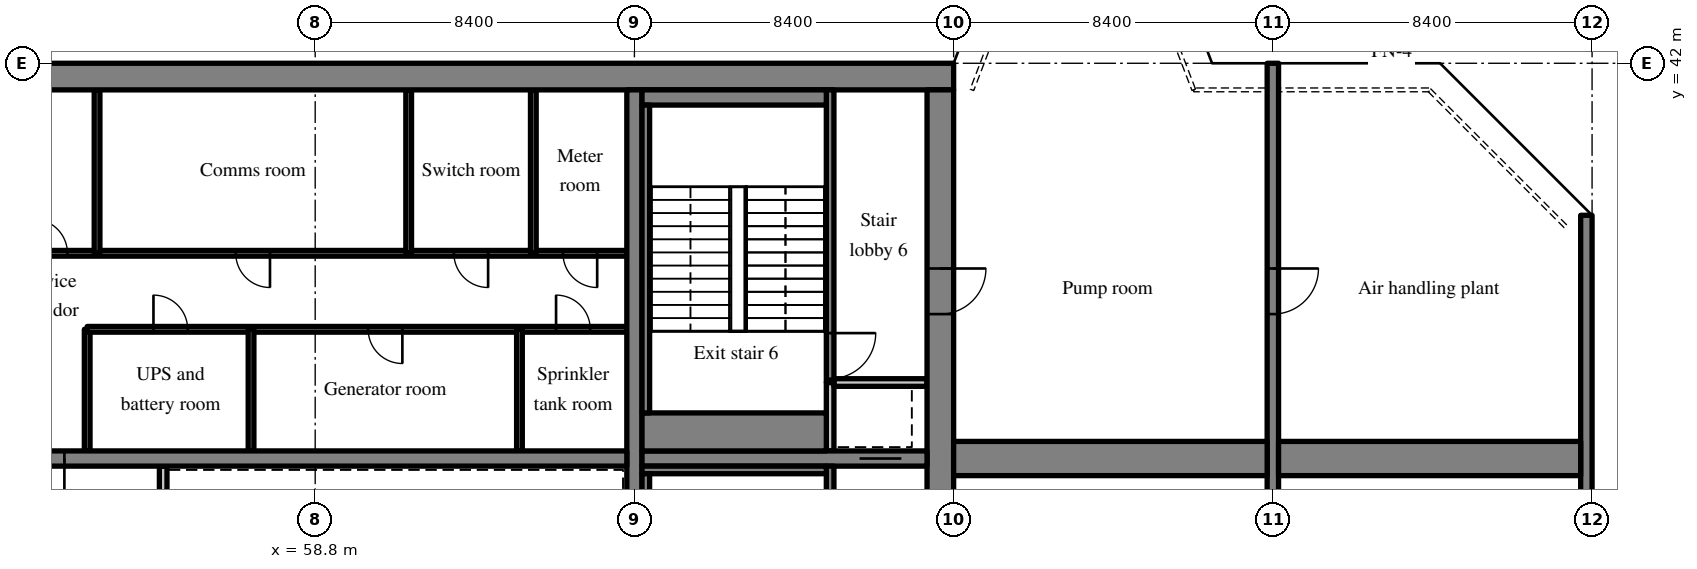
"""IFC4 building model, lengths in metres.
Left out: names, types, materials, properties, quantities, classifications, styles, units other than length and angle.
Written with IfcOpenShell. Run it as: python <this file> out.ifc"""

import sys

from ifc_helpers import new_model, si_unit, direction, frame, frame_2d, origin, place, context, subcontext, project, spatial, rectangle, extrude, source, transform, mapped, element, fill, save


model = new_model("IFC4")
c1 = context("Model", 3, precision=1e-05, world=origin(), true_north=direction((0.0, 1.0)))
c2 = subcontext(c1, "Body", "Model", "MODEL_VIEW")
j1 = project(units=[si_unit("LENGTHUNIT", "METRE"), si_unit("PLANEANGLEUNIT", "RADIAN")], contexts=[c1])
p1 = place(None, origin())
s1 = spatial("IfcSite", under=j1, at=p1, CompositionType="ELEMENT")
p2 = place(p1, origin())
s2 = spatial("IfcBuilding", under=s1, at=p2, CompositionType="ELEMENT")
p3 = place(p2, frame((0.0, 0.0, 201.0)))
s3 = spatial("IfcBuildingStorey", under=s2, at=p3, CompositionType="ELEMENT", Elevation=201.0)
m1 = source(origin(), c2, "Body", "SweptSolid", [
    extrude(rectangle(XDim=50.4, YDim=0.7, at=frame_2d((25.2, 0.0))), origin(), (0.0, 0.0, 1.0), 5.12),
])
p4 = place(p3, frame((25.2, 41.65, 0.0), z_axis=(0.0, 0.0, 1.0), x_axis=(1.0, 0.0, 0.0)))
e1 = element("IfcWall", 1, at=p4, inside=s3, PredefinedType="SHEAR", context=c2, shape_type="MappedRepresentation", body=[
    mapped(m1, transform((0.0, 0.0, 0.0), scale=1.0)),
])
m2 = source(origin(), c2, "Body", "SweptSolid", [
    extrude(rectangle(XDim=18.6, YDim=0.7, at=frame_2d((9.3, 0.0))), origin(), (0.0, 0.0, 1.0), 5.12),
])
p5 = place(p3, frame((75.25, 22.7, 0.0), z_axis=(0.0, 0.0, 1.0), x_axis=(0.0, 1.0, 0.0)))
e2 = element("IfcWall", 2, at=p5, inside=s3, PredefinedType="SHEAR", context=c2, shape_type="MappedRepresentation", body=[
    mapped(m2, transform((0.0, 0.0, 0.0), scale=1.0)),
])
m3 = source(origin(), c2, "Body", "SweptSolid", [
    extrude(rectangle(XDim=1.0, YDim=2.1, at=frame_2d((0.5, 1.05))), frame((0.0, 0.36, 0.0), z_axis=(0.0, -1.0, 0.0), x_axis=(1.0, 0.0, 0.0)), (0.0, 0.0, 1.0), 0.72),
])
p6 = place(p5, frame((2.8, 0.0, 0.0)))
e3 = element("IfcOpeningElement", 3, at=p6, cuts=e2, PredefinedType="OPENING", context=c2, shape_type="MappedRepresentation", body=[
    mapped(m3, transform((0.0, 0.0, 0.0), scale=1.0)),
])
m4 = source(origin(), c2, "Body", "SweptSolid", [
    extrude(rectangle(XDim=1.2, YDim=2.1, at=frame_2d((0.6, 1.05))), frame((0.0, 0.36, 0.0), z_axis=(0.0, -1.0, 0.0), x_axis=(1.0, 0.0, 0.0)), (0.0, 0.0, 1.0), 0.72),
])
p7 = place(p5, frame((12.7, 0.0, 0.0)))
e4 = element("IfcOpeningElement", 4, at=p7, cuts=e2, PredefinedType="OPENING", context=c2, shape_type="MappedRepresentation", body=[
    mapped(m4, transform((0.0, 0.0, 0.0), scale=1.0)),
])
m5 = source(origin(), c2, "Body", "SweptSolid", [
    extrude(rectangle(XDim=18.6, YDim=0.4, at=frame_2d((9.3, 0.0))), origin(), (0.0, 0.0, 1.0), 5.12),
])
p8 = place(p3, frame((67.2, 22.7, 0.0), z_axis=(0.0, 0.0, 1.0), x_axis=(0.0, 1.0, 0.0)))
e5 = element("IfcWall", 5, at=p8, inside=s3, PredefinedType="SHEAR", context=c2, shape_type="MappedRepresentation", body=[
    mapped(m5, transform((0.0, 0.0, 0.0), scale=1.0)),
])
m6 = source(origin(), c2, "Body", "SweptSolid", [
    extrude(rectangle(XDim=16.4, YDim=0.4, at=frame_2d((8.2, 0.0))), origin(), (0.0, 0.0, 1.0), 5.12),
])
p9 = place(p3, frame((50.6, 31.6, 0.0), z_axis=(0.0, 0.0, 1.0), x_axis=(1.0, 0.0, 0.0)))
e6 = element("IfcWall", 6, at=p9, inside=s3, PredefinedType="SHEAR", context=c2, shape_type="MappedRepresentation", body=[
    mapped(m6, transform((0.0, 0.0, 0.0), scale=1.0)),
])
m7 = source(origin(), c2, "Body", "SweptSolid", [
    extrude(rectangle(XDim=1.0, YDim=2.1, at=frame_2d((0.5, 1.05))), frame((0.0, 0.21, 0.0), z_axis=(0.0, -1.0, 0.0), x_axis=(1.0, 0.0, 0.0)), (0.0, 0.0, 1.0), 0.42),
])
p10 = place(p9, frame((0.6, 0.0, 0.0)))
e7 = element("IfcOpeningElement", 7, at=p10, cuts=e6, PredefinedType="OPENING", context=c2, shape_type="MappedRepresentation", body=[
    mapped(m7, transform((0.0, 0.0, 0.0), scale=1.0)),
])
m8 = source(origin(), c2, "Body", "SweptSolid", [
    extrude(rectangle(XDim=7.5, YDim=0.4, at=frame_2d((3.75, 0.0))), origin(), (0.0, 0.0, 1.0), 5.12),
])
p11 = place(p3, frame((67.4, 31.6, 0.0), z_axis=(0.0, 0.0, 1.0), x_axis=(1.0, 0.0, 0.0)))
e8 = element("IfcWall", 8, at=p11, inside=s3, PredefinedType="SHEAR", context=c2, shape_type="MappedRepresentation", body=[
    mapped(m8, transform((0.0, 0.0, 0.0), scale=1.0)),
])
m9 = source(origin(), c2, "Body", "SweptSolid", [
    extrude(rectangle(XDim=1.1, YDim=2.1, at=frame_2d((0.55, 1.05))), frame((0.0, 0.21, 0.0), z_axis=(0.0, -1.0, 0.0), x_axis=(1.0, 0.0, 0.0)), (0.0, 0.0, 1.0), 0.42),
])
p12 = place(p11, frame((5.725, 0.0, 0.0)))
e9 = element("IfcOpeningElement", 9, at=p12, cuts=e8, PredefinedType="OPENING", context=c2, shape_type="MappedRepresentation", body=[
    mapped(m9, transform((0.0, 0.0, 0.0), scale=1.0)),
])
m10 = source(origin(), c2, "Body", "SweptSolid", [
    extrude(rectangle(XDim=20.0, YDim=0.3, at=frame_2d((10.0, 0.0))), origin(), (0.0, 0.0, 1.0), 5.12),
])
p13 = place(p3, frame((84.0, 22.0, 0.0), z_axis=(0.0, 0.0, 1.0), x_axis=(0.0, 1.0, 0.0)))
e10 = element("IfcWall", 10, at=p13, inside=s3, PredefinedType="SHEAR", context=c2, shape_type="MappedRepresentation", body=[
    mapped(m10, transform((0.0, 0.0, 0.0), scale=1.0)),
])
m11 = source(origin(), c2, "Body", "SweptSolid", [
    extrude(rectangle(XDim=1.2, YDim=2.1, at=frame_2d((0.6, 1.05))), frame((0.0, 0.16, 0.0), z_axis=(0.0, -1.0, 0.0), x_axis=(1.0, 0.0, 0.0)), (0.0, 0.0, 1.0), 0.32),
])
p14 = place(p13, frame((13.4, 0.0, 0.0)))
e11 = element("IfcOpeningElement", 11, at=p14, cuts=e10, PredefinedType="OPENING", context=c2, shape_type="MappedRepresentation", body=[
    mapped(m11, transform((0.0, 0.0, 0.0), scale=1.0)),
])
m12 = source(origin(), c2, "Body", "SweptSolid", [
    extrude(rectangle(XDim=16.0, YDim=0.3, at=frame_2d((8.0, 0.0))), origin(), (0.0, 0.0, 1.0), 5.12),
])
p15 = place(p3, frame((92.25, 22.0, 0.0), z_axis=(0.0, 0.0, 1.0), x_axis=(0.0, 1.0, 0.0)))
e12 = element("IfcWall", 12, at=p15, inside=s3, PredefinedType="SHEAR", context=c2, shape_type="MappedRepresentation", body=[
    mapped(m12, transform((0.0, 0.0, 0.0), scale=1.0)),
])
m13 = source(origin(), c2, "Body", "SweptSolid", [
    extrude(rectangle(XDim=8.25, YDim=0.9, at=frame_2d((4.125, 0.0))), origin(), (0.0, 0.0, 1.0), 5.12),
])
p16 = place(p3, frame((75.6, 31.6, 0.0), z_axis=(0.0, 0.0, 1.0), x_axis=(1.0, 0.0, 0.0)))
e13 = element("IfcWall", 13, at=p16, inside=s3, PredefinedType="SHEAR", context=c2, shape_type="MappedRepresentation", body=[
    mapped(m13, transform((0.0, 0.0, 0.0), scale=1.0)),
])
m14 = source(origin(), c2, "Body", "SweptSolid", [
    extrude(rectangle(XDim=7.95, YDim=0.9, at=frame_2d((3.975, 0.0))), origin(), (0.0, 0.0, 1.0), 5.12),
])
p17 = place(p3, frame((84.15, 31.6, 0.0), z_axis=(0.0, 0.0, 1.0), x_axis=(1.0, 0.0, 0.0)))
e14 = element("IfcWall", 14, at=p17, inside=s3, PredefinedType="SHEAR", context=c2, shape_type="MappedRepresentation", body=[
    mapped(m14, transform((0.0, 0.0, 0.0), scale=1.0)),
])
m15 = source(origin(), c2, "Body", "SweptSolid", [
    extrude(rectangle(XDim=2.6, YDim=0.2, at=frame_2d((1.3, 0.0))), origin(), (0.0, 0.0, 1.0), 5.12),
])
p18 = place(p3, frame((54.8, 28.8, 0.0), z_axis=(0.0, 0.0, 1.0), x_axis=(0.0, 1.0, 0.0)))
e15 = element("IfcWall", 15, at=p18, inside=s3, PredefinedType="SOLIDWALL", context=c2, shape_type="MappedRepresentation", body=[
    mapped(m15, transform((0.0, 0.0, 0.0), scale=1.0)),
])
m16 = source(origin(), c2, "Body", "SweptSolid", [
    extrude(rectangle(XDim=3.2, YDim=0.15, at=frame_2d((1.6, 0.0))), origin(), (0.0, 0.0, 1.0), 5.12),
])
p19 = place(p3, frame((52.8, 31.8, 0.0), z_axis=(0.0, 0.0, 1.0), x_axis=(0.0, 1.0, 0.0)))
e16 = element("IfcWall", 16, at=p19, inside=s3, PredefinedType="PARTITIONING", context=c2, shape_type="MappedRepresentation", body=[
    mapped(m16, transform((0.0, 0.0, 0.0), scale=1.0)),
])
m17 = source(origin(), c2, "Body", "SweptSolid", [
    extrude(rectangle(XDim=14.2, YDim=0.15, at=frame_2d((7.1, 0.0))), origin(), (0.0, 0.0, 1.0), 5.12),
])
p20 = place(p3, frame((67.0, 35.0, 0.0), z_axis=(0.0, 0.0, 1.0), x_axis=(-1.0, 0.0, 0.0)))
e17 = element("IfcWall", 17, at=p20, inside=s3, PredefinedType="PARTITIONING", context=c2, shape_type="MappedRepresentation", body=[
    mapped(m17, transform((0.0, 0.0, 0.0), scale=1.0)),
])
m18 = source(origin(), c2, "Body", "SweptSolid", [
    extrude(rectangle(XDim=0.9, YDim=2.1, at=frame_2d((0.45, 1.05))), frame((0.0, 0.085, 0.0), z_axis=(0.0, -1.0, 0.0), x_axis=(1.0, 0.0, 0.0)), (0.0, 0.0, 1.0), 0.17),
])
p21 = place(p20, frame((0.962, 0.0, 0.0)))
e18 = element("IfcOpeningElement", 18, at=p21, cuts=e17, PredefinedType="OPENING", context=c2, shape_type="MappedRepresentation", body=[
    mapped(m18, transform((0.0, 0.0, 0.0), scale=1.0)),
])
p22 = place(p20, frame((5.906, 0.0, 0.0)))
e19 = element("IfcOpeningElement", 19, at=p22, cuts=e17, PredefinedType="OPENING", context=c2, shape_type="MappedRepresentation", body=[
    mapped(m18, transform((0.0, 0.0, 0.0), scale=1.0)),
])
p23 = place(p20, frame((11.556, 0.0, 0.0)))
e20 = element("IfcOpeningElement", 20, at=p23, cuts=e17, PredefinedType="OPENING", context=c2, shape_type="MappedRepresentation", body=[
    mapped(m18, transform((0.0, 0.0, 0.0), scale=1.0)),
])
m19 = source(origin(), c2, "Body", "SweptSolid", [
    extrude(rectangle(XDim=16.4, YDim=0.15, at=frame_2d((8.2, 0.0))), origin(), (0.0, 0.0, 1.0), 5.12),
])
p24 = place(p3, frame((67.0, 37.0, 0.0), z_axis=(0.0, 0.0, 1.0), x_axis=(-1.0, 0.0, 0.0)))
e21 = element("IfcWall", 21, at=p24, inside=s3, PredefinedType="PARTITIONING", context=c2, shape_type="MappedRepresentation", body=[
    mapped(m19, transform((0.0, 0.0, 0.0), scale=1.0)),
])
p25 = place(p24, frame((0.78, 0.0, 0.0)))
e22 = element("IfcOpeningElement", 22, at=p25, cuts=e21, PredefinedType="OPENING", context=c2, shape_type="MappedRepresentation", body=[
    mapped(m18, transform((0.0, 0.0, 0.0), scale=1.0)),
])
p26 = place(p24, frame((3.65, 0.0, 0.0)))
e23 = element("IfcOpeningElement", 23, at=p26, cuts=e21, PredefinedType="OPENING", context=c2, shape_type="MappedRepresentation", body=[
    mapped(m18, transform((0.0, 0.0, 0.0), scale=1.0)),
])
p27 = place(p24, frame((9.39, 0.0, 0.0)))
e24 = element("IfcOpeningElement", 24, at=p27, cuts=e21, PredefinedType="OPENING", context=c2, shape_type="MappedRepresentation", body=[
    mapped(m18, transform((0.0, 0.0, 0.0), scale=1.0)),
])
p28 = place(p24, frame((14.72, 0.0, 0.0)))
e25 = element("IfcOpeningElement", 25, at=p28, cuts=e21, PredefinedType="OPENING", context=c2, shape_type="MappedRepresentation", body=[
    mapped(m18, transform((0.0, 0.0, 0.0), scale=1.0)),
])
for number, where, z_axis, x_axis in (
    (26, (64.175, 31.8, 0.0), (0.0, 0.0, 1.0), (0.0, 1.0, 0.0)),
    (27, (57.112, 31.8, 0.0), (0.0, 0.0, 1.0), (0.0, 1.0, 0.0)),
):
    element("IfcWall", number, at=place(p3, frame(where, z_axis=z_axis, x_axis=x_axis)), inside=s3, PredefinedType="PARTITIONING", context=c2, shape_type="MappedRepresentation", body=[
        mapped(m16, transform((0.0, 0.0, 0.0), scale=1.0)),
    ])
m20 = source(origin(), c2, "Body", "SweptSolid", [
    extrude(rectangle(XDim=4.3, YDim=0.15, at=frame_2d((2.15, 0.0))), origin(), (0.0, 0.0, 1.0), 5.12),
])
for number, where, z_axis, x_axis in (
    (28, (64.54, 37.0, 0.0), (0.0, 0.0, 1.0), (0.0, 1.0, 0.0)),
    (29, (61.26, 37.0, 0.0), (0.0, 0.0, 1.0), (0.0, 1.0, 0.0)),
    (30, (53.06, 37.0, 0.0), (0.0, 0.0, 1.0), (0.0, 1.0, 0.0)),
):
    element("IfcWall", number, at=place(p3, frame(where, z_axis=z_axis, x_axis=x_axis)), inside=s3, PredefinedType="PARTITIONING", context=c2, shape_type="MappedRepresentation", body=[
        mapped(m20, transform((0.0, 0.0, 0.0), scale=1.0)),
    ])
m21 = source(origin(), c2, "Body", "SweptSolid", [
    extrude(rectangle(XDim=8.7, YDim=0.2, at=frame_2d((4.35, 0.0))), origin(), (0.0, 0.0, 1.0), 5.12),
])
p29 = place(p3, frame((72.35, 22.7, 0.0), z_axis=(0.0, 0.0, 1.0), x_axis=(0.0, 1.0, 0.0)))
e31 = element("IfcWall", 31, at=p29, inside=s3, PredefinedType="SOLIDWALL", context=c2, shape_type="MappedRepresentation", body=[
    mapped(m21, transform((0.0, 0.0, 0.0), scale=1.0)),
])
m22 = source(origin(), c2, "Body", "SweptSolid", [
    extrude(rectangle(XDim=1.2, YDim=2.1, at=frame_2d((0.6, 1.05))), frame((0.0, 0.11, 0.0), z_axis=(0.0, -1.0, 0.0), x_axis=(1.0, 0.0, 0.0)), (0.0, 0.0, 1.0), 0.22),
])
p30 = place(p29, frame((0.9, 0.0, 0.0)))
e32 = element("IfcOpeningElement", 32, at=p30, cuts=e31, PredefinedType="OPENING", context=c2, shape_type="MappedRepresentation", body=[
    mapped(m22, transform((0.0, 0.0, 0.0), scale=1.0)),
])
m23 = source(origin(), c2, "Body", "SweptSolid", [
    extrude(rectangle(XDim=1.8, YDim=0.2, at=frame_2d((0.9, 0.0))), origin(), (0.0, 0.0, 1.0), 5.12),
])
p31 = place(p3, frame((72.35, 31.8, 0.0), z_axis=(0.0, 0.0, 1.0), x_axis=(0.0, 1.0, 0.0)))
e33 = element("IfcWall", 33, at=p31, inside=s3, PredefinedType="SOLIDWALL", context=c2, shape_type="MappedRepresentation", body=[
    mapped(m23, transform((0.0, 0.0, 0.0), scale=1.0)),
])
m24 = source(origin(), c2, "Body", "SweptSolid", [
    extrude(rectangle(XDim=2.45, YDim=0.2, at=frame_2d((1.225, 0.0))), origin(), (0.0, 0.0, 1.0), 5.12),
])
p32 = place(p3, frame((72.45, 33.6, 0.0), z_axis=(0.0, 0.0, 1.0), x_axis=(1.0, 0.0, 0.0)))
e34 = element("IfcWall", 34, at=p32, inside=s3, PredefinedType="SOLIDWALL", context=c2, shape_type="MappedRepresentation", body=[
    mapped(m24, transform((0.0, 0.0, 0.0), scale=1.0)),
])
m25 = source(origin(), c2, "Body", "SweptSolid", [
    extrude(rectangle(XDim=7.7, YDim=0.2, at=frame_2d((3.85, 0.0))), origin(), (0.0, 0.0, 1.0), 5.12),
])
p33 = place(p3, frame((72.35, 33.6, 0.0), z_axis=(0.0, 0.0, 1.0), x_axis=(0.0, 1.0, 0.0)))
e35 = element("IfcWall", 35, at=p33, inside=s3, PredefinedType="SOLIDWALL", context=c2, shape_type="MappedRepresentation", body=[
    mapped(m25, transform((0.0, 0.0, 0.0), scale=1.0)),
])
p34 = place(p33, frame((0.1, 0.0, 0.0)))
e36 = element("IfcOpeningElement", 36, at=p34, cuts=e35, PredefinedType="OPENING", context=c2, shape_type="MappedRepresentation", body=[
    mapped(m22, transform((0.0, 0.0, 0.0), scale=1.0)),
])
m26 = source(origin(), c2, "Body", "SweptSolid", [
    extrude(rectangle(XDim=4.85, YDim=0.2, at=frame_2d((2.425, 0.0))), origin(), (0.0, 0.0, 1.0), 5.12),
])
p35 = place(p3, frame((67.4, 31.3, 0.0), z_axis=(0.0, 0.0, 1.0), x_axis=(1.0, 0.0, 0.0)))
e37 = element("IfcWall", 37, at=p35, inside=s3, PredefinedType="SOLIDWALL", context=c2, shape_type="MappedRepresentation", body=[
    mapped(m26, transform((0.0, 0.0, 0.0), scale=1.0)),
])
m27 = source(origin(), c2, "Body", "SweptSolid", [
    extrude(rectangle(XDim=8.1, YDim=0.2, at=frame_2d((4.05, 0.0))), origin(), (0.0, 0.0, 1.0), 5.12),
])
p36 = place(p3, frame((67.5, 23.1, 0.0), z_axis=(0.0, 0.0, 1.0), x_axis=(0.0, 1.0, 0.0)))
e38 = element("IfcWall", 38, at=p36, inside=s3, PredefinedType="SOLIDWALL", context=c2, shape_type="MappedRepresentation", body=[
    mapped(m27, transform((0.0, 0.0, 0.0), scale=1.0)),
])
m28 = source(origin(), c2, "Body", "SweptSolid", [
    extrude(rectangle(XDim=4.85, YDim=0.4, at=frame_2d((2.425, 0.0))), origin(), (0.0, 0.0, 1.0), 5.12),
])
p37 = place(p3, frame((67.4, 41.1, 0.0), z_axis=(0.0, 0.0, 1.0), x_axis=(1.0, 0.0, 0.0)))
e39 = element("IfcWall", 39, at=p37, inside=s3, PredefinedType="SOLIDWALL", context=c2, shape_type="MappedRepresentation", body=[
    mapped(m28, transform((0.0, 0.0, 0.0), scale=1.0)),
])
m29 = source(origin(), c2, "Body", "SweptSolid", [
    extrude(rectangle(XDim=4.85, YDim=1.0, at=frame_2d((2.425, 0.0))), origin(), (0.0, 0.0, 1.0), 5.12),
])
p38 = place(p3, frame((67.4, 32.3, 0.0), z_axis=(0.0, 0.0, 1.0), x_axis=(1.0, 0.0, 0.0)))
e40 = element("IfcWall", 40, at=p38, inside=s3, PredefinedType="SOLIDWALL", context=c2, shape_type="MappedRepresentation", body=[
    mapped(m29, transform((0.0, 0.0, 0.0), scale=1.0)),
])
p39 = place(p3, frame((67.5, 32.8, 0.0), z_axis=(0.0, 0.0, 1.0), x_axis=(0.0, 1.0, 0.0)))
e41 = element("IfcWall", 41, at=p39, inside=s3, PredefinedType="SOLIDWALL", context=c2, shape_type="MappedRepresentation", body=[
    mapped(m27, transform((0.0, 0.0, 0.0), scale=1.0)),
])
m30 = source(origin(), c2, "Body", "SweptSolid", [
    extrude(rectangle(XDim=1.0, YDim=2.1, at=frame_2d((0.5, 1.05))), frame((0.0, 0.025, 0.0), z_axis=(0.0, -1.0, 0.0), x_axis=(1.0, 0.0, 0.0)), (0.0, 0.0, 1.0), 0.05),
])
p40 = place(p10, origin())
e42 = element("IfcDoor", 42, at=p40, inside=s3, OperationType="SINGLE_SWING_RIGHT", PredefinedType="DOOR", context=c2, shape_type="MappedRepresentation", body=[
    mapped(m30, transform((0.0, 0.0, 0.0), scale=1.0)),
])
fill(e7, e42)
m31 = source(origin(), c2, "Body", "SweptSolid", [
    extrude(rectangle(XDim=0.9, YDim=2.1, at=frame_2d((0.45, 1.05))), frame((0.0, 0.025, 0.0), z_axis=(0.0, -1.0, 0.0), x_axis=(1.0, 0.0, 0.0)), (0.0, 0.0, 1.0), 0.05),
])
p41 = place(p21, origin())
e43 = element("IfcDoor", 43, at=p41, inside=s3, OperationType="SINGLE_SWING_RIGHT", PredefinedType="DOOR", context=c2, shape_type="MappedRepresentation", body=[
    mapped(m31, transform((0.0, 0.0, 0.0), scale=1.0)),
])
fill(e18, e43)
p42 = place(p22, origin())
e44 = element("IfcDoor", 44, at=p42, inside=s3, OperationType="SINGLE_SWING_LEFT", PredefinedType="DOOR", context=c2, shape_type="MappedRepresentation", body=[
    mapped(m31, transform((0.0, 0.0, 0.0), scale=1.0)),
])
fill(e19, e44)
p43 = place(p23, origin())
e45 = element("IfcDoor", 45, at=p43, inside=s3, OperationType="SINGLE_SWING_RIGHT", PredefinedType="DOOR", context=c2, shape_type="MappedRepresentation", body=[
    mapped(m31, transform((0.0, 0.0, 0.0), scale=1.0)),
])
fill(e20, e45)
p44 = place(p25, origin())
e46 = element("IfcDoor", 46, at=p44, inside=s3, OperationType="SINGLE_SWING_LEFT", PredefinedType="DOOR", context=c2, shape_type="MappedRepresentation", body=[
    mapped(m31, transform((0.0, 0.0, 0.0), scale=1.0)),
])
fill(e22, e46)
p45 = place(p26, origin())
e47 = element("IfcDoor", 47, at=p45, inside=s3, OperationType="SINGLE_SWING_LEFT", PredefinedType="DOOR", context=c2, shape_type="MappedRepresentation", body=[
    mapped(m31, transform((0.0, 0.0, 0.0), scale=1.0)),
])
fill(e23, e47)
p46 = place(p27, origin())
e48 = element("IfcDoor", 48, at=p46, inside=s3, OperationType="SINGLE_SWING_LEFT", PredefinedType="DOOR", context=c2, shape_type="MappedRepresentation", body=[
    mapped(m31, transform((0.0, 0.0, 0.0), scale=1.0)),
])
fill(e24, e48)
p47 = place(p28, origin())
e49 = element("IfcDoor", 49, at=p47, inside=s3, OperationType="SINGLE_SWING_RIGHT", PredefinedType="DOOR", context=c2, shape_type="MappedRepresentation", body=[
    mapped(m31, transform((0.0, 0.0, 0.0), scale=1.0)),
])
fill(e25, e49)
m32 = source(origin(), c2, "Body", "SweptSolid", [
    extrude(rectangle(XDim=1.1, YDim=2.1, at=frame_2d((0.55, 1.05))), frame((0.0, 0.025, 0.0), z_axis=(0.0, -1.0, 0.0), x_axis=(1.0, 0.0, 0.0)), (0.0, 0.0, 1.0), 0.05),
])
p48 = place(p12, origin())
e50 = element("IfcDoor", 50, at=p48, inside=s3, OperationType="SLIDING_TO_LEFT", PredefinedType="DOOR", context=c2, shape_type="MappedRepresentation", body=[
    mapped(m32, transform((0.0, 0.0, 0.0), scale=1.0)),
])
fill(e9, e50)
m33 = source(origin(), c2, "Body", "SweptSolid", [
    extrude(rectangle(XDim=1.2, YDim=2.1, at=frame_2d((0.6, 1.05))), frame((0.0, 0.025, 0.0), z_axis=(0.0, -1.0, 0.0), x_axis=(1.0, 0.0, 0.0)), (0.0, 0.0, 1.0), 0.05),
])
p49 = place(p34, origin())
e51 = element("IfcDoor", 51, at=p49, inside=s3, OperationType="SINGLE_SWING_RIGHT", PredefinedType="DOOR", context=c2, shape_type="MappedRepresentation", body=[
    mapped(m33, transform((0.0, 0.0, 0.0), scale=1.0)),
])
fill(e36, e51)
p50 = place(p7, origin())
e52 = element("IfcDoor", 52, at=p50, inside=s3, OperationType="SINGLE_SWING_RIGHT", PredefinedType="DOOR", context=c2, shape_type="MappedRepresentation", body=[
    mapped(m33, transform((0.0, 0.0, 0.0), scale=1.0)),
])
fill(e4, e52)
p51 = place(p14, origin())
e53 = element("IfcDoor", 53, at=p51, inside=s3, OperationType="SINGLE_SWING_RIGHT", PredefinedType="DOOR", context=c2, shape_type="MappedRepresentation", body=[
    mapped(m33, transform((0.0, 0.0, 0.0), scale=1.0)),
])
fill(e11, e53)
save(model, sys.argv[1])
